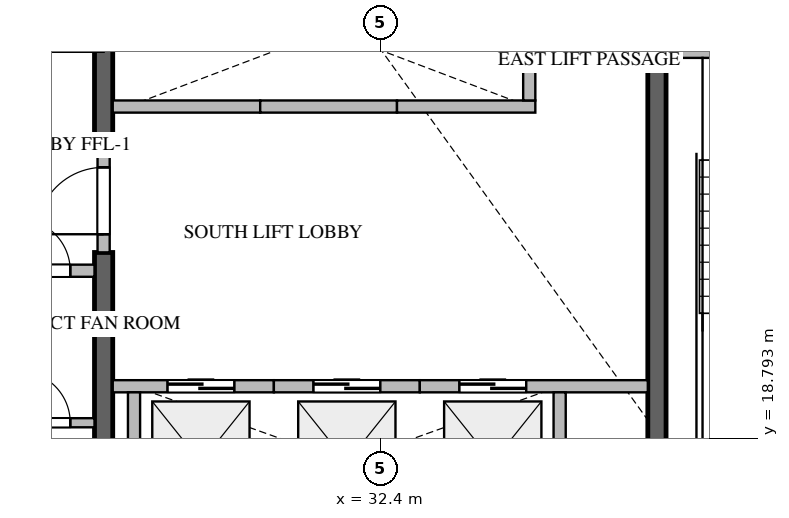
"""IFC4 building model, lengths in metres.
Left out: names, types, materials, properties, quantities, classifications, styles, units other than length and angle.
Written with IfcOpenShell. Run it as: python <this file> out.ifc"""

import sys

from ifc_helpers import new_model, si_unit, direction, frame, frame_2d, origin, place, context, subcontext, project, spatial, rectangle, extrude, source, transform, mapped, element, fill, save


model = new_model("IFC4")
c1 = context("Model", 3, precision=1e-05, world=origin(), true_north=direction((0.0, 1.0)))
c2 = subcontext(c1, "Body", "Model", "MODEL_VIEW")
j1 = project(units=[si_unit("LENGTHUNIT", "METRE"), si_unit("PLANEANGLEUNIT", "RADIAN")], contexts=[c1])
p1 = place(None, origin())
s1 = spatial("IfcSite", under=j1, at=p1, CompositionType="ELEMENT")
p2 = place(p1, origin())
s2 = spatial("IfcBuilding", under=s1, at=p2, CompositionType="ELEMENT")
p3 = place(p2, frame((0.0, 0.0, 56.7)))
s3 = spatial("IfcBuildingStorey", under=s2, at=p3, CompositionType="ELEMENT", Elevation=56.7)
p4 = place(p3, frame((27.85, 17.025, -0.26), z_axis=(0.0, 0.0, 1.0), x_axis=(0.0, 1.0, 0.0)))
e1 = element("IfcWall", 1, at=p4, inside=s3, PredefinedType="SHEAR", context=c2, shape_type="SweptSolid", body=[
    extrude(rectangle(XDim=4.825, YDim=0.3, at=frame_2d((2.413, 0.0))), origin(), (0.0, 0.0, 1.0), 3.748),
])
p5 = place(p3, frame((27.85, 23.55, -0.26), z_axis=(0.0, 0.0, 1.0), x_axis=(0.0, 1.0, 0.0)))
e2 = element("IfcWall", 2, at=p5, inside=s3, PredefinedType="SHEAR", context=c2, shape_type="SweptSolid", body=[
    extrude(rectangle(XDim=9.825, YDim=0.3, at=frame_2d((4.913, 0.0))), origin(), (0.0, 0.0, 1.0), 3.748),
])
p6 = place(p3, frame((36.95, 17.025, -0.26), z_axis=(0.0, 0.0, 1.0), x_axis=(0.0, 1.0, 0.0)))
e3 = element("IfcWall", 3, at=p6, inside=s3, PredefinedType="SHEAR", context=c2, shape_type="SweptSolid", body=[
    extrude(rectangle(XDim=8.325, YDim=0.3, at=frame_2d((4.163, 0.0))), origin(), (0.0, 0.0, 1.0), 3.748),
])
p7 = place(p3, frame((36.95, 25.15, 0.0), z_axis=(0.0, 0.0, 1.0), x_axis=(1.0, 0.0, 0.0)))
e4 = element("IfcWall", 4, at=p7, inside=s3, PredefinedType="STANDARD", context=c2, shape_type="SweptSolid", body=[
    extrude(rectangle(XDim=4.45, YDim=0.2, at=frame_2d((2.225, 0.0))), origin(), (0.0, 0.0, 1.0), 3.49),
])
p8 = place(p7, frame((1.65, 0.0, 0.0)))
e5 = element("IfcOpeningElement", 5, at=p8, cuts=e4, PredefinedType="OPENING", context=c2, shape_type="SweptSolid", body=[
    extrude(rectangle(XDim=1.1, YDim=2.15, at=frame_2d((0.55, 1.075))), frame((0.0, 0.11, 0.0), z_axis=(0.0, -1.0, 0.0), x_axis=(1.0, 0.0, 0.0)), (0.0, 0.0, 1.0), 0.22),
])
p9 = place(p3, frame((28.0, 19.65, 0.0), z_axis=(0.0, 0.0, 1.0), x_axis=(1.0, 0.0, 0.0)))
e6 = element("IfcWall", 6, at=p9, inside=s3, PredefinedType="STANDARD", context=c2, shape_type="SweptSolid", body=[
    extrude(rectangle(XDim=2.65, YDim=0.2, at=frame_2d((1.325, 0.0))), origin(), (0.0, 0.0, 1.0), 3.49),
])
p10 = place(p9, frame((0.9, 0.0, 0.0)))
e7 = element("IfcOpeningElement", 7, at=p10, cuts=e6, PredefinedType="OPENING", context=c2, shape_type="SweptSolid", body=[
    extrude(rectangle(XDim=1.1, YDim=2.2, at=frame_2d((0.55, 1.1))), frame((0.0, 0.11, 0.0), z_axis=(0.0, -1.0, 0.0), x_axis=(1.0, 0.0, 0.0)), (0.0, 0.0, 1.0), 0.22),
])
p11 = place(p3, frame((28.35, 17.025, 0.0), z_axis=(0.0, 0.0, 1.0), x_axis=(0.0, 1.0, 0.0)))
e8 = element("IfcWall", 8, at=p11, inside=s3, PredefinedType="STANDARD", context=c2, shape_type="SweptSolid", body=[
    extrude(rectangle(XDim=2.525, YDim=0.2, at=frame_2d((1.263, 0.0))), origin(), (0.0, 0.0, 1.0), 3.49),
])
p12 = place(p3, frame((30.65, 19.65, 0.0), z_axis=(0.0, 0.0, 1.0), x_axis=(1.0, 0.0, 0.0)))
e9 = element("IfcWall", 9, at=p12, inside=s3, PredefinedType="STANDARD", context=c2, shape_type="SweptSolid", body=[
    extrude(rectangle(XDim=2.4, YDim=0.2, at=frame_2d((1.2, 0.0))), origin(), (0.0, 0.0, 1.0), 3.49),
])
p13 = place(p12, frame((0.65, 0.0, 0.0)))
e10 = element("IfcOpeningElement", 10, at=p13, cuts=e9, PredefinedType="OPENING", context=c2, shape_type="SweptSolid", body=[
    extrude(rectangle(XDim=1.1, YDim=2.2, at=frame_2d((0.55, 1.1))), frame((0.0, 0.11, 0.0), z_axis=(0.0, -1.0, 0.0), x_axis=(1.0, 0.0, 0.0)), (0.0, 0.0, 1.0), 0.22),
])
p14 = place(p3, frame((33.05, 19.65, 0.0), z_axis=(0.0, 0.0, 1.0), x_axis=(1.0, 0.0, 0.0)))
e11 = element("IfcWall", 11, at=p14, inside=s3, PredefinedType="STANDARD", context=c2, shape_type="SweptSolid", body=[
    extrude(rectangle(XDim=3.75, YDim=0.2, at=frame_2d((1.875, 0.0))), origin(), (0.0, 0.0, 1.0), 3.49),
])
p15 = place(p14, frame((0.65, 0.0, 0.0)))
e12 = element("IfcOpeningElement", 12, at=p15, cuts=e11, PredefinedType="OPENING", context=c2, shape_type="SweptSolid", body=[
    extrude(rectangle(XDim=1.1, YDim=2.2, at=frame_2d((0.55, 1.1))), frame((0.0, 0.11, 0.0), z_axis=(0.0, -1.0, 0.0), x_axis=(1.0, 0.0, 0.0)), (0.0, 0.0, 1.0), 0.22),
])
p16 = place(p3, frame((35.35, 17.025, 0.0), z_axis=(0.0, 0.0, 1.0), x_axis=(0.0, 1.0, 0.0)))
e13 = element("IfcWall", 13, at=p16, inside=s3, PredefinedType="STANDARD", context=c2, shape_type="SweptSolid", body=[
    extrude(rectangle(XDim=2.525, YDim=0.2, at=frame_2d((1.263, 0.0))), origin(), (0.0, 0.0, 1.0), 3.49),
])
p17 = place(p3, frame((28.0, 24.25, 0.0), z_axis=(0.0, 0.0, 1.0), x_axis=(1.0, 0.0, 0.0)))
e14 = element("IfcWall", 14, at=p17, inside=s3, PredefinedType="STANDARD", context=c2, shape_type="SweptSolid", body=[
    extrude(rectangle(XDim=2.425, YDim=0.2, at=frame_2d((1.212, 0.0))), origin(), (0.0, 0.0, 1.0), 3.49),
])
p18 = place(p3, frame((30.425, 24.25, 0.0), z_axis=(0.0, 0.0, 1.0), x_axis=(1.0, 0.0, 0.0)))
e15 = element("IfcWall", 15, at=p18, inside=s3, PredefinedType="STANDARD", context=c2, shape_type="SweptSolid", body=[
    extrude(rectangle(XDim=2.25, YDim=0.2, at=frame_2d((1.125, 0.0))), origin(), (0.0, 0.0, 1.0), 3.49),
])
p19 = place(p3, frame((32.675, 24.25, 0.0), z_axis=(0.0, 0.0, 1.0), x_axis=(1.0, 0.0, 0.0)))
e16 = element("IfcWall", 16, at=p19, inside=s3, PredefinedType="STANDARD", context=c2, shape_type="SweptSolid", body=[
    extrude(rectangle(XDim=2.275, YDim=0.2, at=frame_2d((1.137, 0.0))), origin(), (0.0, 0.0, 1.0), 3.49),
])
p20 = place(p3, frame((34.85, 24.35, 0.0), z_axis=(0.0, 0.0, 1.0), x_axis=(0.0, 1.0, 0.0)))
e17 = element("IfcWall", 17, at=p20, inside=s3, PredefinedType="STANDARD", context=c2, shape_type="SweptSolid", body=[
    extrude(rectangle(XDim=2.5, YDim=0.2, at=frame_2d((1.25, 0.0))), origin(), (0.0, 0.0, 1.0), 3.49),
])
p21 = place(p3, frame((26.052, 21.55, 0.0), z_axis=(0.0, 0.0, 1.0), x_axis=(1.0, 0.0, 0.0)))
e18 = element("IfcWall", 18, at=p21, inside=s3, PredefinedType="STANDARD", context=c2, shape_type="SweptSolid", body=[
    extrude(rectangle(XDim=1.648, YDim=0.2, at=frame_2d((0.824, 0.0))), origin(), (0.0, 0.0, 1.0), 3.49),
])
p22 = place(p21, frame((0.399, 0.0, 0.0)))
e19 = element("IfcOpeningElement", 19, at=p22, cuts=e18, PredefinedType="OPENING", context=c2, shape_type="SweptSolid", body=[
    extrude(rectangle(XDim=0.85, YDim=2.1, at=frame_2d((0.425, 1.05))), frame((0.0, 0.11, 0.0), z_axis=(0.0, -1.0, 0.0), x_axis=(1.0, 0.0, 0.0)), (0.0, 0.0, 1.0), 0.22),
])
p23 = place(p3, frame((27.85, 21.852, 0.0), z_axis=(0.0, 0.0, 1.0), x_axis=(0.0, 1.0, 0.0)))
e20 = element("IfcWall", 20, at=p23, inside=s3, PredefinedType="STANDARD", context=c2, shape_type="SweptSolid", body=[
    extrude(rectangle(XDim=1.696, YDim=0.2, at=frame_2d((0.848, 0.0))), origin(), (0.0, 0.0, 1.0), 3.49),
])
p24 = place(p23, frame((0.298, 0.0, 0.0)))
e21 = element("IfcOpeningElement", 21, at=p24, cuts=e20, PredefinedType="OPENING", context=c2, shape_type="SweptSolid", body=[
    extrude(rectangle(XDim=1.1, YDim=2.15, at=frame_2d((0.55, 1.075))), frame((0.0, 0.11, 0.0), z_axis=(0.0, -1.0, 0.0), x_axis=(1.0, 0.0, 0.0)), (0.0, 0.0, 1.0), 0.22),
])
p25 = place(p3, frame((26.052, 19.05, 0.0), z_axis=(0.0, 0.0, 1.0), x_axis=(1.0, 0.0, 0.0)))
e22 = element("IfcWall", 22, at=p25, inside=s3, PredefinedType="PARTITIONING", context=c2, shape_type="SweptSolid", body=[
    extrude(rectangle(XDim=1.648, YDim=0.15, at=frame_2d((0.824, 0.0))), origin(), (0.0, 0.0, 1.0), 3.49),
])
p26 = place(p25, frame((0.399, 0.0, 0.0)))
e23 = element("IfcOpeningElement", 23, at=p26, cuts=e22, PredefinedType="OPENING", context=c2, shape_type="SweptSolid", body=[
    extrude(rectangle(XDim=0.85, YDim=2.1, at=frame_2d((0.425, 1.05))), frame((0.0, 0.085, 0.0), z_axis=(0.0, -1.0, 0.0), x_axis=(1.0, 0.0, 0.0)), (0.0, 0.0, 1.0), 0.17),
])
m1 = source(origin(), c2, "Body", "SweptSolid", [
    extrude(rectangle(XDim=1.1, YDim=2.2, at=frame_2d((0.55, 1.1))), frame((0.0, 0.025, 0.0), z_axis=(0.0, -1.0, 0.0), x_axis=(1.0, 0.0, 0.0)), (0.0, 0.0, 1.0), 0.05),
])
p27 = place(p10, origin())
e24 = element("IfcDoor", 24, at=p27, inside=s3, OperationType="DOUBLE_DOOR_SLIDING", PredefinedType="DOOR", context=c2, shape_type="MappedRepresentation", body=[
    mapped(m1, transform((0.0, 0.0, 0.0), scale=1.0)),
])
fill(e7, e24)
p28 = place(p13, origin())
e25 = element("IfcDoor", 25, at=p28, inside=s3, OperationType="DOUBLE_DOOR_SLIDING", PredefinedType="DOOR", context=c2, shape_type="MappedRepresentation", body=[
    mapped(m1, transform((0.0, 0.0, 0.0), scale=1.0)),
])
fill(e10, e25)
p29 = place(p15, origin())
e26 = element("IfcDoor", 26, at=p29, inside=s3, OperationType="DOUBLE_DOOR_SLIDING", PredefinedType="DOOR", context=c2, shape_type="MappedRepresentation", body=[
    mapped(m1, transform((0.0, 0.0, 0.0), scale=1.0)),
])
fill(e12, e26)
m2 = source(origin(), c2, "Body", "SweptSolid", [
    extrude(rectangle(XDim=0.85, YDim=2.1, at=frame_2d((0.425, 1.05))), frame((0.0, 0.025, 0.0), z_axis=(0.0, -1.0, 0.0), x_axis=(1.0, 0.0, 0.0)), (0.0, 0.0, 1.0), 0.05),
])
p30 = place(p22, origin())
e27 = element("IfcDoor", 27, at=p30, inside=s3, OperationType="SINGLE_SWING_LEFT", PredefinedType="DOOR", context=c2, shape_type="MappedRepresentation", body=[
    mapped(m2, transform((0.0, 0.0, 0.0), scale=1.0)),
])
fill(e19, e27)
m3 = source(origin(), c2, "Body", "SweptSolid", [
    extrude(rectangle(XDim=1.1, YDim=2.15, at=frame_2d((0.55, 1.075))), frame((0.0, 0.025, 0.0), z_axis=(0.0, -1.0, 0.0), x_axis=(1.0, 0.0, 0.0)), (0.0, 0.0, 1.0), 0.05),
])
p31 = place(p24, origin())
e28 = element("IfcDoor", 28, at=p31, inside=s3, OperationType="SINGLE_SWING_LEFT", PredefinedType="DOOR", context=c2, shape_type="MappedRepresentation", body=[
    mapped(m3, transform((0.0, 0.0, 0.0), scale=1.0)),
])
fill(e21, e28)
p32 = place(p26, origin())
e29 = element("IfcDoor", 29, at=p32, inside=s3, OperationType="SINGLE_SWING_LEFT", PredefinedType="DOOR", context=c2, shape_type="MappedRepresentation", body=[
    mapped(m2, transform((0.0, 0.0, 0.0), scale=1.0)),
])
fill(e23, e29)
save(model, sys.argv[1])
